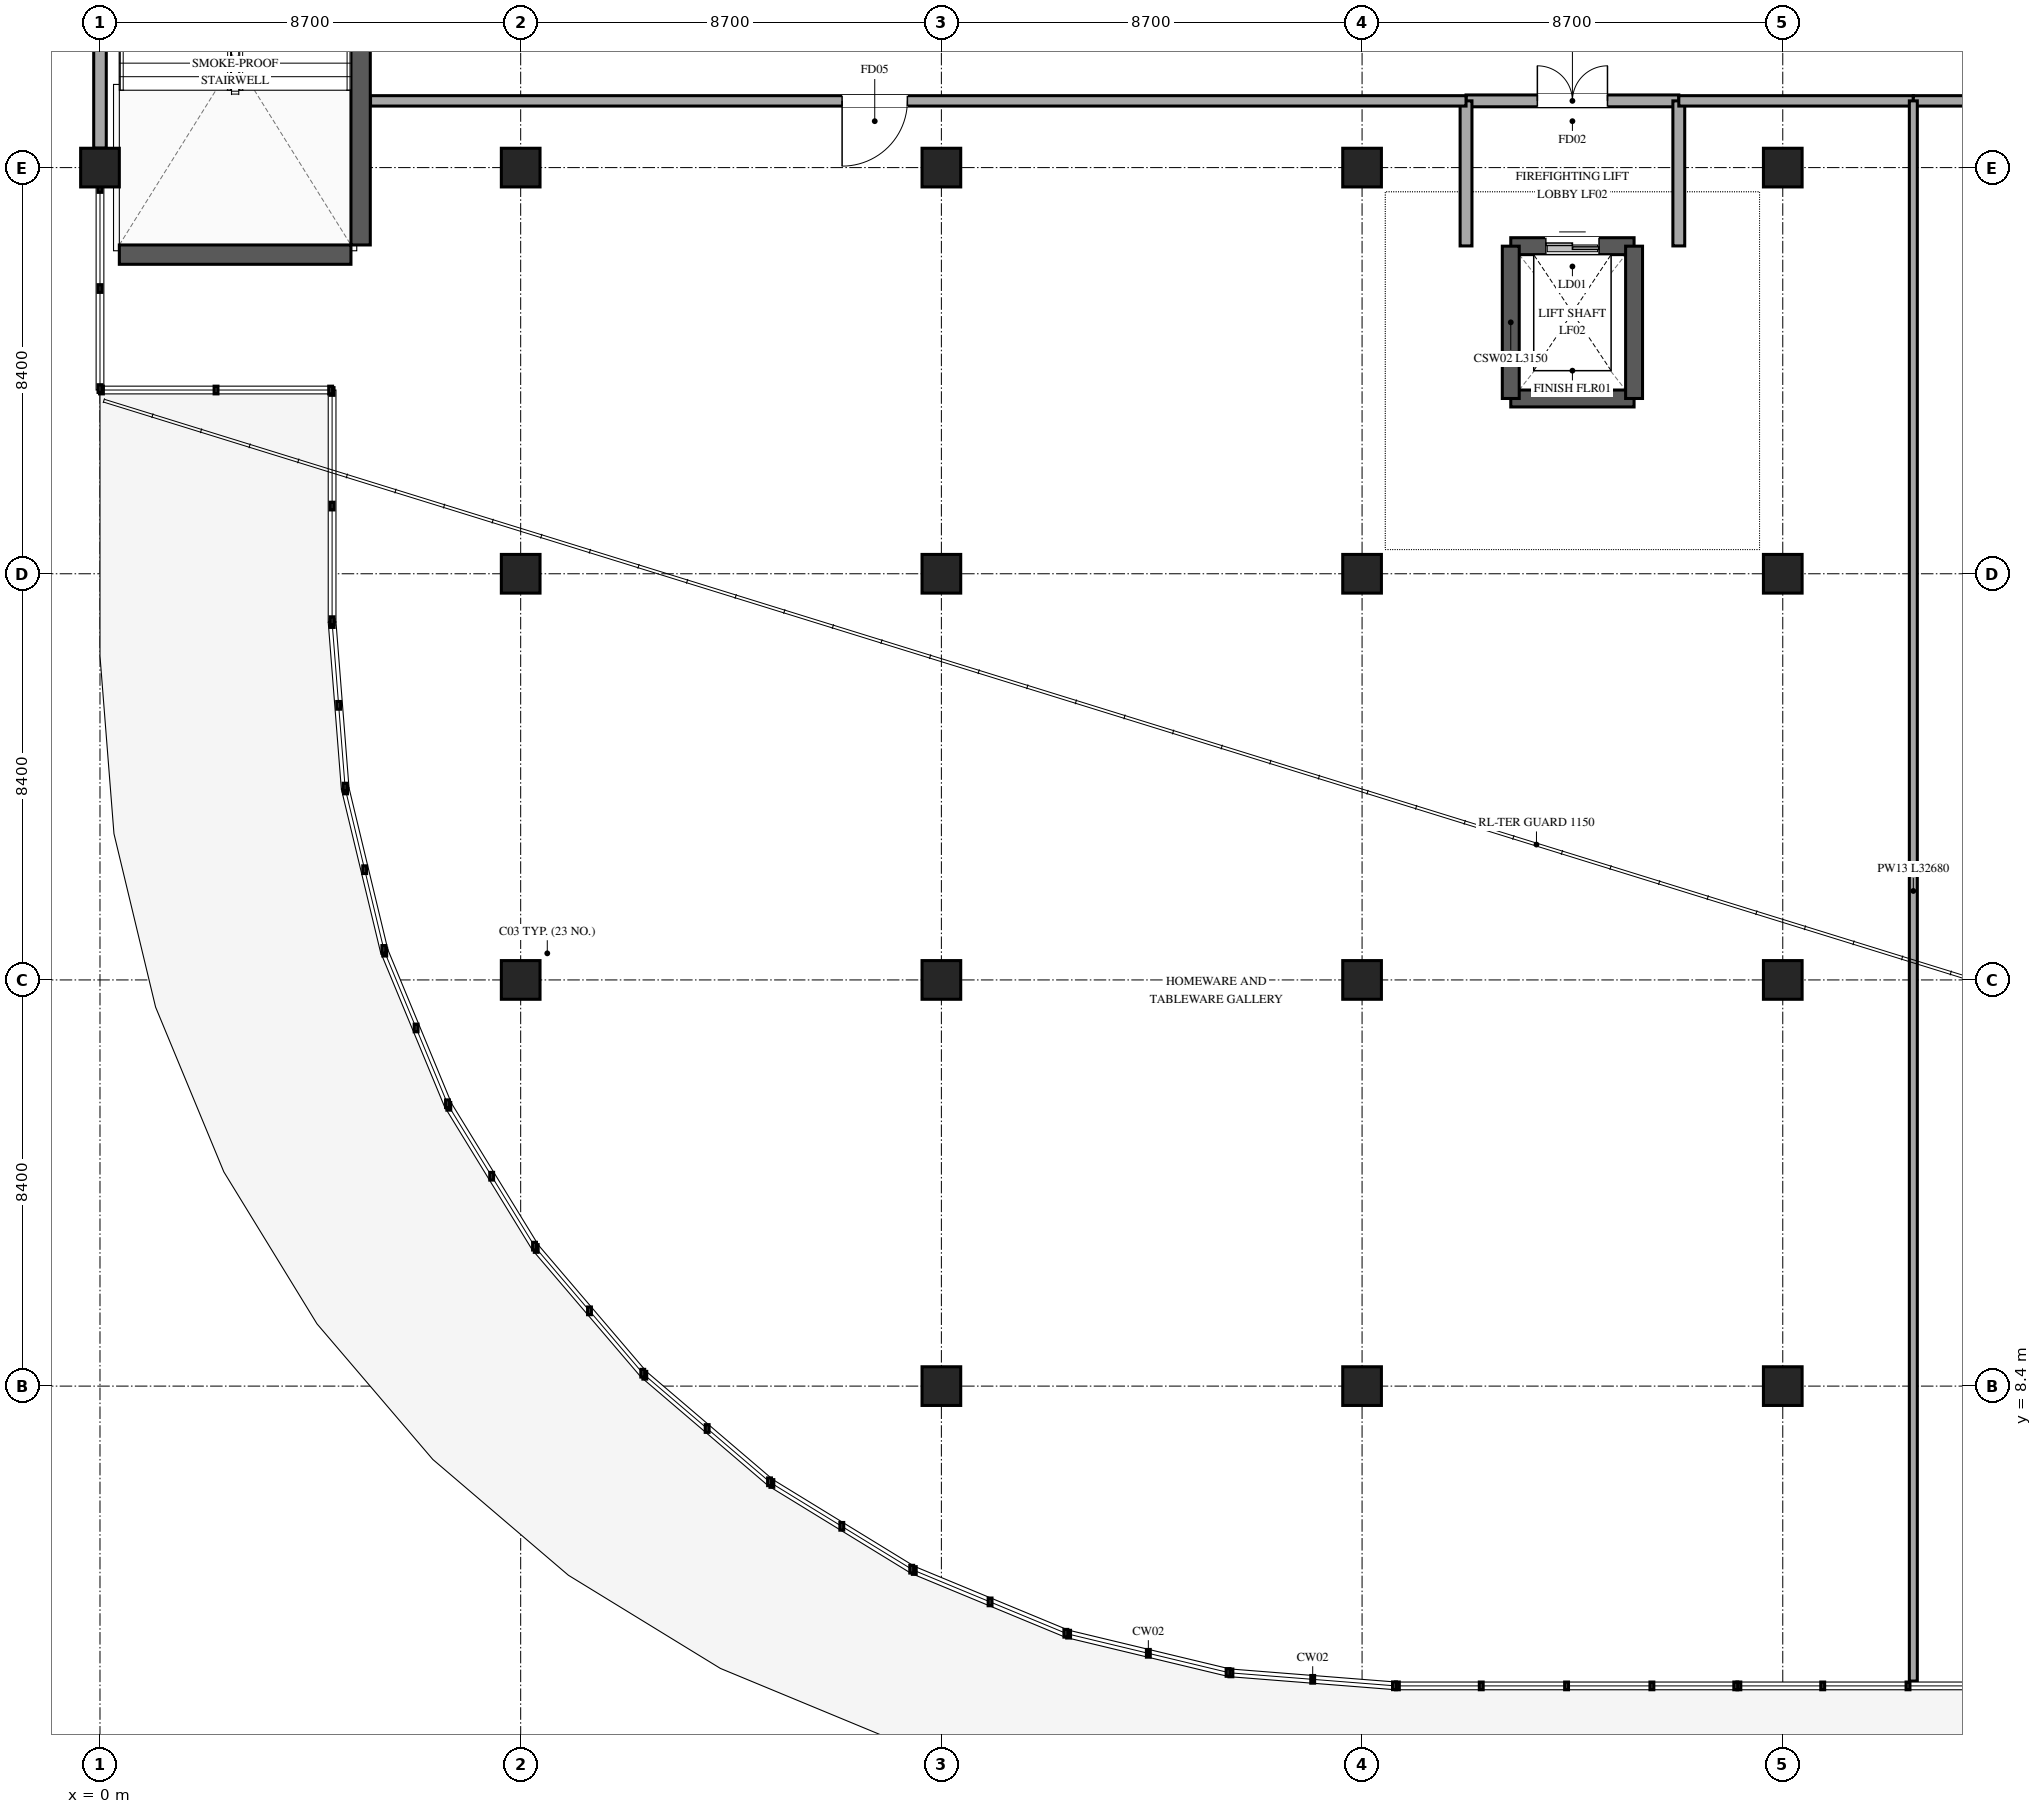
"""IFC4 building model, lengths in metres.
Left out: names, types, materials, properties, quantities, classifications, styles, units other than length and angle.
Written with IfcOpenShell. Run it as: python <this file> out.ifc"""

import sys

from ifc_helpers import new_model, si_unit, direction, frame, frame_2d, origin, origin_2d, place, context, subcontext, project, spatial, rectangle, extrude, element, fill, save


model = new_model("IFC4")
c1 = context("Model", 3, precision=1e-05, world=origin(), true_north=direction((0.0, 1.0)))
c2 = subcontext(c1, "Body", "Model", "MODEL_VIEW")
j1 = project(units=[si_unit("LENGTHUNIT", "METRE"), si_unit("PLANEANGLEUNIT", "RADIAN")], contexts=[c1])
p1 = place(None, origin())
s1 = spatial("IfcSite", under=j1, at=p1, CompositionType="ELEMENT")
p2 = place(p1, origin())
s2 = spatial("IfcBuilding", under=s1, at=p2, CompositionType="ELEMENT")
p3 = place(p2, frame((0.0, 0.0, 16.5)))
s3 = spatial("IfcBuildingStorey", under=s2, at=p3, CompositionType="ELEMENT", Elevation=16.5)
for number, where, z_axis, x_axis in (
    (1, (0.0, 33.6, 0.0), (0.0, 0.0, 1.0), (1.0, 0.0, 0.0)),
    (2, (8.7, 16.8, 0.0), (0.0, 0.0, 1.0), (1.0, 0.0, 0.0)),
    (3, (8.7, 25.2, 0.0), (0.0, 0.0, 1.0), (1.0, 0.0, 0.0)),
    (4, (8.7, 33.6, 0.0), (0.0, 0.0, 1.0), (1.0, 0.0, 0.0)),
    (5, (17.4, 8.4, 0.0), (0.0, 0.0, 1.0), (1.0, 0.0, 0.0)),
    (6, (17.4, 16.8, 0.0), (0.0, 0.0, 1.0), (1.0, 0.0, 0.0)),
    (7, (17.4, 25.2, 0.0), (0.0, 0.0, 1.0), (1.0, 0.0, 0.0)),
    (8, (17.4, 33.6, 0.0), (0.0, 0.0, 1.0), (1.0, 0.0, 0.0)),
    (9, (26.1, 8.4, 0.0), (0.0, 0.0, 1.0), (1.0, 0.0, 0.0)),
    (10, (26.1, 16.8, 0.0), (0.0, 0.0, 1.0), (1.0, 0.0, 0.0)),
    (11, (26.1, 25.2, 0.0), (0.0, 0.0, 1.0), (1.0, 0.0, 0.0)),
    (12, (26.1, 33.6, 0.0), (0.0, 0.0, 1.0), (1.0, 0.0, 0.0)),
    (13, (34.8, 8.4, 0.0), (0.0, 0.0, 1.0), (1.0, 0.0, 0.0)),
    (14, (34.8, 16.8, 0.0), (0.0, 0.0, 1.0), (1.0, 0.0, 0.0)),
    (15, (34.8, 25.2, 0.0), (0.0, 0.0, 1.0), (1.0, 0.0, 0.0)),
    (16, (34.8, 33.6, 0.0), (0.0, 0.0, 1.0), (1.0, 0.0, 0.0)),
):
    element("IfcColumn", number, at=place(p3, frame(where, z_axis=z_axis, x_axis=x_axis)), inside=s3, PredefinedType="COLUMN", context=c2, shape_type="SweptSolid", body=[
        extrude(rectangle(XDim=0.8, YDim=0.8, at=origin_2d()), origin(), (0.0, 0.0, 1.0), 5.1),
    ])
p4 = place(p3, frame((0.0, 34.002, 0.0), z_axis=(0.0, 0.0, 1.0), x_axis=(0.0, 1.0, 0.0)))
e17 = element("IfcWall", 17, at=p4, inside=s3, PredefinedType="STANDARD", context=c2, shape_type="SweptSolid", body=[
    extrude(rectangle(XDim=7.596, YDim=0.26, at=frame_2d((3.798, 0.0))), origin(), (0.0, 0.0, 1.0), 4.79),
])
p5 = place(p3, frame((5.39, 42.0, 0.0), z_axis=(0.0, 0.0, 1.0), x_axis=(0.0, -1.0, 0.0)))
e18 = element("IfcWall", 18, at=p5, inside=s3, PredefinedType="SHEAR", context=c2, shape_type="SweptSolid", body=[
    extrude(rectangle(XDim=10.0, YDim=0.4, at=frame_2d((5.0, 0.0))), origin(), (0.0, 0.0, 1.0), 5.1),
])
p6 = place(p5, frame((0.41, 0.0, 0.0)))
e19 = element("IfcOpeningElement", 19, at=p6, cuts=e18, PredefinedType="OPENING", context=c2, shape_type="SweptSolid", body=[
    extrude(rectangle(XDim=1.5, YDim=2.2, at=frame_2d((0.75, 1.1))), frame((0.0, 0.21, 0.0), z_axis=(0.0, -1.0, 0.0), x_axis=(1.0, 0.0, 0.0)), (0.0, 0.0, 1.0), 0.42),
])
p7 = place(p3, frame((5.19, 31.8, 0.0), z_axis=(0.0, 0.0, 1.0), x_axis=(-1.0, 0.0, 0.0)))
e20 = element("IfcWall", 20, at=p7, inside=s3, PredefinedType="SHEAR", context=c2, shape_type="SweptSolid", body=[
    extrude(rectangle(XDim=4.79, YDim=0.4, at=frame_2d((2.395, 0.0))), origin(), (0.0, 0.0, 1.0), 5.1),
])
p8 = place(p3, frame((29.175, 31.975, 0.0), z_axis=(0.0, 0.0, 1.0), x_axis=(1.0, 0.0, 0.0)))
e21 = element("IfcWall", 21, at=p8, inside=s3, PredefinedType="SHEAR", context=c2, shape_type="SweptSolid", body=[
    extrude(rectangle(XDim=2.55, YDim=0.35, at=frame_2d((1.275, 0.0))), origin(), (0.0, 0.0, 1.0), 5.1),
])
p9 = place(p8, frame((0.725, 0.0, 0.0)))
e22 = element("IfcOpeningElement", 22, at=p9, cuts=e21, PredefinedType="OPENING", context=c2, shape_type="SweptSolid", body=[
    extrude(rectangle(XDim=1.1, YDim=2.2, at=frame_2d((0.55, 1.1))), frame((0.0, 0.185, 0.0), z_axis=(0.0, -1.0, 0.0), x_axis=(1.0, 0.0, 0.0)), (0.0, 0.0, 1.0), 0.37),
])
p10 = place(p3, frame((31.725, 28.825, 0.0), z_axis=(0.0, 0.0, 1.0), x_axis=(-1.0, 0.0, 0.0)))
e23 = element("IfcWall", 23, at=p10, inside=s3, PredefinedType="SHEAR", context=c2, shape_type="SweptSolid", body=[
    extrude(rectangle(XDim=2.55, YDim=0.35, at=frame_2d((1.275, 0.0))), origin(), (0.0, 0.0, 1.0), 5.1),
])
for number, where, z_axis, x_axis in (
    (24, (29.175, 28.825, 0.0), (0.0, 0.0, 1.0), (0.0, 1.0, 0.0)),
    (25, (31.725, 31.975, 0.0), (0.0, 0.0, 1.0), (0.0, -1.0, 0.0)),
):
    element("IfcWall", number, at=place(p3, frame(where, z_axis=z_axis, x_axis=x_axis)), inside=s3, PredefinedType="SHEAR", context=c2, shape_type="SweptSolid", body=[
        extrude(rectangle(XDim=3.15, YDim=0.35, at=frame_2d((1.575, 0.0))), origin(), (0.0, 0.0, 1.0), 5.1),
    ])
p11 = place(p3, frame((28.25, 34.98, 0.0), z_axis=(0.0, 0.0, 1.0), x_axis=(1.0, 0.0, 0.0)))
e26 = element("IfcWall", 26, at=p11, inside=s3, PredefinedType="STANDARD", context=c2, shape_type="SweptSolid", body=[
    extrude(rectangle(XDim=4.4, YDim=0.245, at=frame_2d((2.2, 0.0))), origin(), (0.0, 0.0, 1.0), 4.76),
])
p12 = place(p11, frame((1.475, 0.0, 0.0)))
e27 = element("IfcOpeningElement", 27, at=p12, cuts=e26, PredefinedType="OPENING", context=c2, shape_type="SweptSolid", body=[
    extrude(rectangle(XDim=1.45, YDim=2.2, at=frame_2d((0.725, 1.1))), frame((0.0, 0.133, 0.0), z_axis=(0.0, -1.0, 0.0), x_axis=(1.0, 0.0, 0.0)), (0.0, 0.0, 1.0), 0.265),
])
for number, where, z_axis, x_axis in (
    (28, (28.25, 31.98, 0.0), (0.0, 0.0, 1.0), (0.0, 1.0, 0.0)),
    (29, (32.65, 34.98, 0.0), (0.0, 0.0, 1.0), (0.0, -1.0, 0.0)),
):
    element("IfcWall", number, at=place(p3, frame(where, z_axis=z_axis, x_axis=x_axis)), inside=s3, PredefinedType="STANDARD", context=c2, shape_type="SweptSolid", body=[
        extrude(rectangle(XDim=3.0, YDim=0.245, at=frame_2d((1.5, 0.0))), origin(), (0.0, 0.0, 1.0), 4.06),
    ])
p13 = place(p3, frame((28.25, 34.98, 0.0), z_axis=(0.0, 0.0, 1.0), x_axis=(-1.0, 0.0, 0.0)))
e30 = element("IfcWall", 30, at=p13, inside=s3, PredefinedType="PARTITIONING", context=c2, shape_type="SweptSolid", body=[
    extrude(rectangle(XDim=22.655, YDim=0.215, at=frame_2d((11.328, 0.0))), origin(), (0.0, 0.0, 1.0), 4.06),
])
p14 = place(p13, frame((11.553, 0.0, 0.0)))
e31 = element("IfcOpeningElement", 31, at=p14, cuts=e30, PredefinedType="OPENING", context=c2, shape_type="SweptSolid", body=[
    extrude(rectangle(XDim=1.35, YDim=2.2, at=frame_2d((0.675, 1.1))), frame((0.0, 0.118, 0.0), z_axis=(0.0, -1.0, 0.0), x_axis=(1.0, 0.0, 0.0)), (0.0, 0.0, 1.0), 0.235),
])
p15 = place(p3, frame((37.5, 34.98, 0.0), z_axis=(0.0, 0.0, 1.0), x_axis=(-1.0, 0.0, 0.0)))
e32 = element("IfcWall", 32, at=p15, inside=s3, PredefinedType="PARTITIONING", context=c2, shape_type="SweptSolid", body=[
    extrude(rectangle(XDim=4.85, YDim=0.215, at=frame_2d((2.425, 0.0))), origin(), (0.0, 0.0, 1.0), 4.06),
])
p16 = place(p3, frame((44.6, 34.98, 0.0), z_axis=(0.0, 0.0, 1.0), x_axis=(-1.0, 0.0, 0.0)))
e33 = element("IfcWall", 33, at=p16, inside=s3, PredefinedType="PARTITIONING", context=c2, shape_type="SweptSolid", body=[
    extrude(rectangle(XDim=7.1, YDim=0.215, at=frame_2d((3.55, 0.0))), origin(), (0.0, 0.0, 1.0), 4.06),
])
p17 = place(p16, frame((2.875, 0.0, 0.0)))
e34 = element("IfcOpeningElement", 34, at=p17, cuts=e33, PredefinedType="OPENING", context=c2, shape_type="SweptSolid", body=[
    extrude(rectangle(XDim=1.35, YDim=2.2, at=frame_2d((0.675, 1.1))), frame((0.0, 0.118, 0.0), z_axis=(0.0, -1.0, 0.0), x_axis=(1.0, 0.0, 0.0)), (0.0, 0.0, 1.0), 0.235),
])
p18 = place(p3, frame((37.5, 34.98, 0.0), z_axis=(0.0, 0.0, 1.0), x_axis=(0.0, -1.0, 0.0)))
e35 = element("IfcWall", 35, at=p18, inside=s3, PredefinedType="PARTITIONING", context=c2, shape_type="SweptSolid", body=[
    extrude(rectangle(XDim=32.68, YDim=0.165, at=frame_2d((16.34, 0.0))), origin(), (0.0, 0.0, 1.0), 4.06),
])
p19 = place(p9, origin())
e36 = element("IfcDoor", 36, at=p19, inside=s3, OperationType="DOUBLE_DOOR_SLIDING", PredefinedType="DOOR", context=c2, shape_type="SweptSolid", body=[
    extrude(rectangle(XDim=1.1, YDim=2.2, at=frame_2d((0.55, 1.1))), frame((0.0, 0.025, 0.0), z_axis=(0.0, -1.0, 0.0), x_axis=(1.0, 0.0, 0.0)), (0.0, 0.0, 1.0), 0.05),
])
fill(e22, e36)
p20 = place(p12, origin())
e37 = element("IfcDoor", 37, at=p20, inside=s3, OperationType="DOUBLE_DOOR_SINGLE_SWING", PredefinedType="DOOR", context=c2, shape_type="SweptSolid", body=[
    extrude(rectangle(XDim=1.45, YDim=2.2, at=frame_2d((0.725, 1.1))), frame((0.0, 0.025, 0.0), z_axis=(0.0, -1.0, 0.0), x_axis=(1.0, 0.0, 0.0)), (0.0, 0.0, 1.0), 0.05),
])
fill(e27, e37)
p21 = place(p14, origin())
e38 = element("IfcDoor", 38, at=p21, inside=s3, OperationType="SINGLE_SWING_RIGHT", PredefinedType="DOOR", context=c2, shape_type="SweptSolid", body=[
    extrude(rectangle(XDim=1.35, YDim=2.2, at=frame_2d((0.675, 1.1))), frame((0.0, 0.025, 0.0), z_axis=(0.0, -1.0, 0.0), x_axis=(1.0, 0.0, 0.0)), (0.0, 0.0, 1.0), 0.05),
])
fill(e31, e38)
save(model, sys.argv[1])
